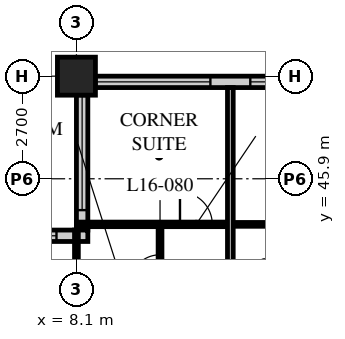
"""IFC4 building model, lengths in metres.
Left out: names, types, materials, properties, quantities, classifications, styles, units other than length and angle.
Written with IfcOpenShell. Run it as: python <this file> out.ifc"""

import sys

from ifc_helpers import new_model, si_unit, direction, frame, frame_2d, origin, origin_2d, place, context, subcontext, project, spatial, rectangle, hollow_rectangle, extrude, element, fill, save


model = new_model("IFC4")
c1 = context("Model", 3, precision=1e-05, world=origin(), true_north=direction((0.0, 1.0)))
c2 = subcontext(c1, "Body", "Model", "MODEL_VIEW")
j1 = project(units=[si_unit("LENGTHUNIT", "METRE"), si_unit("PLANEANGLEUNIT", "RADIAN")], contexts=[c1])
p1 = place(None, origin())
s1 = spatial("IfcSite", under=j1, at=p1, CompositionType="ELEMENT")
p2 = place(p1, origin())
s2 = spatial("IfcBuilding", under=s1, at=p2, CompositionType="ELEMENT")
p3 = place(p2, frame((0.0, 0.0, 67.0)))
s3 = spatial("IfcBuildingStorey", under=s2, at=p3, CompositionType="ELEMENT", Elevation=67.0)
p4 = place(p3, frame((8.1, 48.6, 0.0), z_axis=(0.0, 0.0, 1.0), x_axis=(1.0, 0.0, 0.0)))
e1 = element("IfcColumn", 1, at=p4, inside=s3, PredefinedType="COLUMN", context=c2, shape_type="SweptSolid", body=[
    extrude(hollow_rectangle(XDim=1.0, YDim=1.0, WallThickness=0.1, at=origin_2d()), origin(), (0.0, 0.0, 1.0), 3.4),
])
p5 = place(p3, frame((48.3, 48.45, 0.0), z_axis=(0.0, 0.0, 1.0), x_axis=(-1.0, 0.0, 0.0)))
e2 = element("IfcWall", 2, at=p5, inside=s3, PredefinedType="SOLIDWALL", context=c2, shape_type="SweptSolid", body=[
    extrude(rectangle(XDim=40.2, YDim=0.3, at=frame_2d((20.1, 0.0))), origin(), (0.0, 0.0, 1.0), 3.19),
])
p6 = place(p5, frame((0.225, 0.0, 0.9)))
e3 = element("IfcOpeningElement", 3, at=p6, cuts=e2, PredefinedType="OPENING", context=c2, shape_type="SweptSolid", body=[
    extrude(rectangle(XDim=3.0, YDim=2.0, at=frame_2d((1.5, 1.0))), frame((0.0, 0.16, 0.0), z_axis=(0.0, -1.0, 0.0), x_axis=(1.0, 0.0, 0.0)), (0.0, 0.0, 1.0), 0.32),
])
p7 = place(p5, frame((4.275, 0.0, 0.9)))
e4 = element("IfcOpeningElement", 4, at=p7, cuts=e2, PredefinedType="OPENING", context=c2, shape_type="SweptSolid", body=[
    extrude(rectangle(XDim=3.0, YDim=2.0, at=frame_2d((1.5, 1.0))), frame((0.0, 0.16, 0.0), z_axis=(0.0, -1.0, 0.0), x_axis=(1.0, 0.0, 0.0)), (0.0, 0.0, 1.0), 0.32),
])
p8 = place(p5, frame((8.325, 0.0, 0.9)))
e5 = element("IfcOpeningElement", 5, at=p8, cuts=e2, PredefinedType="OPENING", context=c2, shape_type="SweptSolid", body=[
    extrude(rectangle(XDim=3.0, YDim=2.0, at=frame_2d((1.5, 1.0))), frame((0.0, 0.16, 0.0), z_axis=(0.0, -1.0, 0.0), x_axis=(1.0, 0.0, 0.0)), (0.0, 0.0, 1.0), 0.32),
])
p9 = place(p5, frame((12.375, 0.0, 0.9)))
e6 = element("IfcOpeningElement", 6, at=p9, cuts=e2, PredefinedType="OPENING", context=c2, shape_type="SweptSolid", body=[
    extrude(rectangle(XDim=3.0, YDim=2.0, at=frame_2d((1.5, 1.0))), frame((0.0, 0.16, 0.0), z_axis=(0.0, -1.0, 0.0), x_axis=(1.0, 0.0, 0.0)), (0.0, 0.0, 1.0), 0.32),
])
p10 = place(p5, frame((16.425, 0.0, 0.9)))
e7 = element("IfcOpeningElement", 7, at=p10, cuts=e2, PredefinedType="OPENING", context=c2, shape_type="SweptSolid", body=[
    extrude(rectangle(XDim=3.0, YDim=2.0, at=frame_2d((1.5, 1.0))), frame((0.0, 0.16, 0.0), z_axis=(0.0, -1.0, 0.0), x_axis=(1.0, 0.0, 0.0)), (0.0, 0.0, 1.0), 0.32),
])
p11 = place(p5, frame((20.475, 0.0, 0.9)))
e8 = element("IfcOpeningElement", 8, at=p11, cuts=e2, PredefinedType="OPENING", context=c2, shape_type="SweptSolid", body=[
    extrude(rectangle(XDim=3.0, YDim=2.0, at=frame_2d((1.5, 1.0))), frame((0.0, 0.16, 0.0), z_axis=(0.0, -1.0, 0.0), x_axis=(1.0, 0.0, 0.0)), (0.0, 0.0, 1.0), 0.32),
])
p12 = place(p5, frame((24.525, 0.0, 0.9)))
e9 = element("IfcOpeningElement", 9, at=p12, cuts=e2, PredefinedType="OPENING", context=c2, shape_type="SweptSolid", body=[
    extrude(rectangle(XDim=3.0, YDim=2.0, at=frame_2d((1.5, 1.0))), frame((0.0, 0.16, 0.0), z_axis=(0.0, -1.0, 0.0), x_axis=(1.0, 0.0, 0.0)), (0.0, 0.0, 1.0), 0.32),
])
p13 = place(p5, frame((28.575, 0.0, 0.9)))
e10 = element("IfcOpeningElement", 10, at=p13, cuts=e2, PredefinedType="OPENING", context=c2, shape_type="SweptSolid", body=[
    extrude(rectangle(XDim=3.0, YDim=2.0, at=frame_2d((1.5, 1.0))), frame((0.0, 0.16, 0.0), z_axis=(0.0, -1.0, 0.0), x_axis=(1.0, 0.0, 0.0)), (0.0, 0.0, 1.0), 0.32),
])
p14 = place(p5, frame((32.625, 0.0, 0.9)))
e11 = element("IfcOpeningElement", 11, at=p14, cuts=e2, PredefinedType="OPENING", context=c2, shape_type="SweptSolid", body=[
    extrude(rectangle(XDim=3.0, YDim=2.0, at=frame_2d((1.5, 1.0))), frame((0.0, 0.16, 0.0), z_axis=(0.0, -1.0, 0.0), x_axis=(1.0, 0.0, 0.0)), (0.0, 0.0, 1.0), 0.32),
])
p15 = place(p5, frame((36.675, 0.0, 0.9)))
e12 = element("IfcOpeningElement", 12, at=p15, cuts=e2, PredefinedType="OPENING", context=c2, shape_type="SweptSolid", body=[
    extrude(rectangle(XDim=3.0, YDim=2.0, at=frame_2d((1.5, 1.0))), frame((0.0, 0.16, 0.0), z_axis=(0.0, -1.0, 0.0), x_axis=(1.0, 0.0, 0.0)), (0.0, 0.0, 1.0), 0.32),
])
p16 = place(p3, frame((8.25, 48.3, 0.0), z_axis=(0.0, 0.0, 1.0), x_axis=(0.0, -1.0, 0.0)))
e13 = element("IfcWall", 13, at=p16, inside=s3, PredefinedType="SOLIDWALL", context=c2, shape_type="SweptSolid", body=[
    extrude(rectangle(XDim=3.75, YDim=0.3, at=frame_2d((1.875, 0.0))), origin(), (0.0, 0.0, 1.0), 3.19),
])
p17 = place(p16, frame((0.225, 0.0, 0.9)))
e14 = element("IfcOpeningElement", 14, at=p17, cuts=e13, PredefinedType="OPENING", context=c2, shape_type="SweptSolid", body=[
    extrude(rectangle(XDim=3.0, YDim=1.5, at=frame_2d((1.5, 0.75))), frame((0.0, 0.16, 0.0), z_axis=(0.0, -1.0, 0.0), x_axis=(1.0, 0.0, 0.0)), (0.0, 0.0, 1.0), 0.32),
])
p18 = place(p3, frame((8.4, 44.4, 0.0), z_axis=(0.0, 0.0, 1.0), x_axis=(-1.0, 0.0, 0.0)))
e15 = element("IfcWall", 15, at=p18, inside=s3, PredefinedType="SOLIDWALL", context=c2, shape_type="SweptSolid", body=[
    extrude(rectangle(XDim=4.35, YDim=0.3, at=frame_2d((2.175, 0.0))), origin(), (0.0, 0.0, 1.0), 3.19),
])
p19 = place(p18, frame((0.825, 0.0, 0.9)))
e16 = element("IfcOpeningElement", 16, at=p19, cuts=e15, PredefinedType="OPENING", context=c2, shape_type="SweptSolid", body=[
    extrude(rectangle(XDim=3.0, YDim=1.5, at=frame_2d((1.5, 0.75))), frame((0.0, 0.16, 0.0), z_axis=(0.0, -1.0, 0.0), x_axis=(1.0, 0.0, 0.0)), (0.0, 0.0, 1.0), 0.32),
])
p20 = place(p3, frame((12.15, 44.7, 0.0), z_axis=(0.0, 0.0, 1.0), x_axis=(1.0, 0.0, 0.0)))
e17 = element("IfcWall", 17, at=p20, inside=s3, PredefinedType="PARTITIONING", context=c2, shape_type="SweptSolid", body=[
    extrude(rectangle(XDim=5.2, YDim=0.1, at=frame_2d((2.6, 0.0))), origin(), (0.0, 0.0, 1.0), 3.19),
])
p21 = place(p20, frame((1.3, 0.0, 0.0)))
e18 = element("IfcOpeningElement", 18, at=p21, cuts=e17, PredefinedType="OPENING", context=c2, shape_type="SweptSolid", body=[
    extrude(rectangle(XDim=0.8, YDim=2.1, at=frame_2d((0.4, 1.05))), frame((0.0, 0.06, 0.0), z_axis=(0.0, -1.0, 0.0), x_axis=(1.0, 0.0, 0.0)), (0.0, 0.0, 1.0), 0.12),
])
p22 = place(p20, frame((3.9, 0.0, 0.0)))
e19 = element("IfcOpeningElement", 19, at=p22, cuts=e17, PredefinedType="OPENING", context=c2, shape_type="SweptSolid", body=[
    extrude(rectangle(XDim=0.8, YDim=2.1, at=frame_2d((0.4, 1.05))), frame((0.0, 0.06, 0.0), z_axis=(0.0, -1.0, 0.0), x_axis=(1.0, 0.0, 0.0)), (0.0, 0.0, 1.0), 0.12),
])
p23 = place(p3, frame((8.1, 44.7, 0.0), z_axis=(0.0, 0.0, 1.0), x_axis=(1.0, 0.0, 0.0)))
e20 = element("IfcWall", 20, at=p23, inside=s3, PredefinedType="PARTITIONING", context=c2, shape_type="SweptSolid", body=[
    extrude(rectangle(XDim=4.05, YDim=0.12, at=frame_2d((2.025, 0.0))), origin(), (0.0, 0.0, 1.0), 3.19),
])
p24 = place(p23, frame((2.725, 0.0, 0.0)))
e21 = element("IfcOpeningElement", 21, at=p24, cuts=e20, PredefinedType="OPENING", context=c2, shape_type="SweptSolid", body=[
    extrude(rectangle(XDim=0.85, YDim=2.1, at=frame_2d((0.425, 1.05))), frame((0.0, 0.07, 0.0), z_axis=(0.0, -1.0, 0.0), x_axis=(1.0, 0.0, 0.0)), (0.0, 0.0, 1.0), 0.14),
])
p25 = place(p3, frame((10.3, 42.3, 0.0), z_axis=(0.0, 0.0, 1.0), x_axis=(0.0, 1.0, 0.0)))
e22 = element("IfcWall", 22, at=p25, inside=s3, PredefinedType="PARTITIONING", context=c2, shape_type="SweptSolid", body=[
    extrude(rectangle(XDim=2.4, YDim=0.1, at=frame_2d((1.2, 0.0))), origin(), (0.0, 0.0, 1.0), 3.19),
])
p26 = place(p25, frame((0.8, 0.0, 0.0)))
e23 = element("IfcOpeningElement", 23, at=p26, cuts=e22, PredefinedType="OPENING", context=c2, shape_type="SweptSolid", body=[
    extrude(rectangle(XDim=0.8, YDim=2.1, at=frame_2d((0.4, 1.05))), frame((0.0, 0.06, 0.0), z_axis=(0.0, -1.0, 0.0), x_axis=(1.0, 0.0, 0.0)), (0.0, 0.0, 1.0), 0.12),
])
p27 = place(p3, frame((8.1, 42.3, 0.0), z_axis=(0.0, 0.0, 1.0), x_axis=(0.0, 1.0, 0.0)))
e24 = element("IfcWall", 24, at=p27, inside=s3, PredefinedType="PARTITIONING", context=c2, shape_type="SweptSolid", body=[
    extrude(rectangle(XDim=2.25, YDim=0.1, at=frame_2d((1.125, 0.0))), origin(), (0.0, 0.0, 1.0), 2.578),
])
p28 = place(p3, frame((12.15, 42.3, 0.0), z_axis=(0.0, 0.0, 1.0), x_axis=(0.0, 1.0, 0.0)))
e25 = element("IfcWall", 25, at=p28, inside=s3, PredefinedType="PARTITIONING", context=c2, shape_type="SweptSolid", body=[
    extrude(rectangle(XDim=6.0, YDim=0.15, at=frame_2d((3.0, 0.0))), origin(), (0.0, 0.0, 1.0), 3.19),
])
p29 = place(p14, origin())
e26 = element("IfcWindow", 26, at=p29, inside=s3, PartitioningType="SINGLE_PANEL", PredefinedType="WINDOW", context=c2, shape_type="SweptSolid", body=[
    extrude(rectangle(XDim=3.0, YDim=2.0, at=frame_2d((1.5, 1.0))), frame((0.0, 0.03, 0.0), z_axis=(0.0, -1.0, 0.0), x_axis=(1.0, 0.0, 0.0)), (0.0, 0.0, 1.0), 0.06),
])
fill(e11, e26)
p30 = place(p15, origin())
e27 = element("IfcWindow", 27, at=p30, inside=s3, PartitioningType="SINGLE_PANEL", PredefinedType="WINDOW", context=c2, shape_type="SweptSolid", body=[
    extrude(rectangle(XDim=3.0, YDim=2.0, at=frame_2d((1.5, 1.0))), frame((0.0, 0.03, 0.0), z_axis=(0.0, -1.0, 0.0), x_axis=(1.0, 0.0, 0.0)), (0.0, 0.0, 1.0), 0.06),
])
fill(e12, e27)
p31 = place(p17, origin())
e28 = element("IfcWindow", 28, at=p31, inside=s3, PartitioningType="SINGLE_PANEL", PredefinedType="WINDOW", context=c2, shape_type="SweptSolid", body=[
    extrude(rectangle(XDim=3.0, YDim=1.5, at=frame_2d((1.5, 0.75))), frame((0.0, 0.03, 0.0), z_axis=(0.0, -1.0, 0.0), x_axis=(1.0, 0.0, 0.0)), (0.0, 0.0, 1.0), 0.06),
])
fill(e14, e28)
p32 = place(p19, origin())
e29 = element("IfcWindow", 29, at=p32, inside=s3, PartitioningType="SINGLE_PANEL", PredefinedType="WINDOW", context=c2, shape_type="SweptSolid", body=[
    extrude(rectangle(XDim=3.0, YDim=1.5, at=frame_2d((1.5, 0.75))), frame((0.0, 0.03, 0.0), z_axis=(0.0, -1.0, 0.0), x_axis=(1.0, 0.0, 0.0)), (0.0, 0.0, 1.0), 0.06),
])
fill(e16, e29)
p33 = place(p26, origin())
e30 = element("IfcDoor", 30, at=p33, inside=s3, OperationType="SINGLE_SWING_LEFT", PredefinedType="DOOR", context=c2, shape_type="SweptSolid", body=[
    extrude(rectangle(XDim=0.8, YDim=2.1, at=frame_2d((0.4, 1.05))), frame((0.0, 0.025, 0.0), z_axis=(0.0, -1.0, 0.0), x_axis=(1.0, 0.0, 0.0)), (0.0, 0.0, 1.0), 0.05),
])
fill(e23, e30)
p34 = place(p24, origin())
e31 = element("IfcDoor", 31, at=p34, inside=s3, OperationType="SINGLE_SWING_LEFT", PredefinedType="DOOR", context=c2, shape_type="SweptSolid", body=[
    extrude(rectangle(XDim=0.85, YDim=2.1, at=frame_2d((0.425, 1.05))), frame((0.0, 0.025, 0.0), z_axis=(0.0, -1.0, 0.0), x_axis=(1.0, 0.0, 0.0)), (0.0, 0.0, 1.0), 0.05),
])
fill(e21, e31)
save(model, sys.argv[1])
